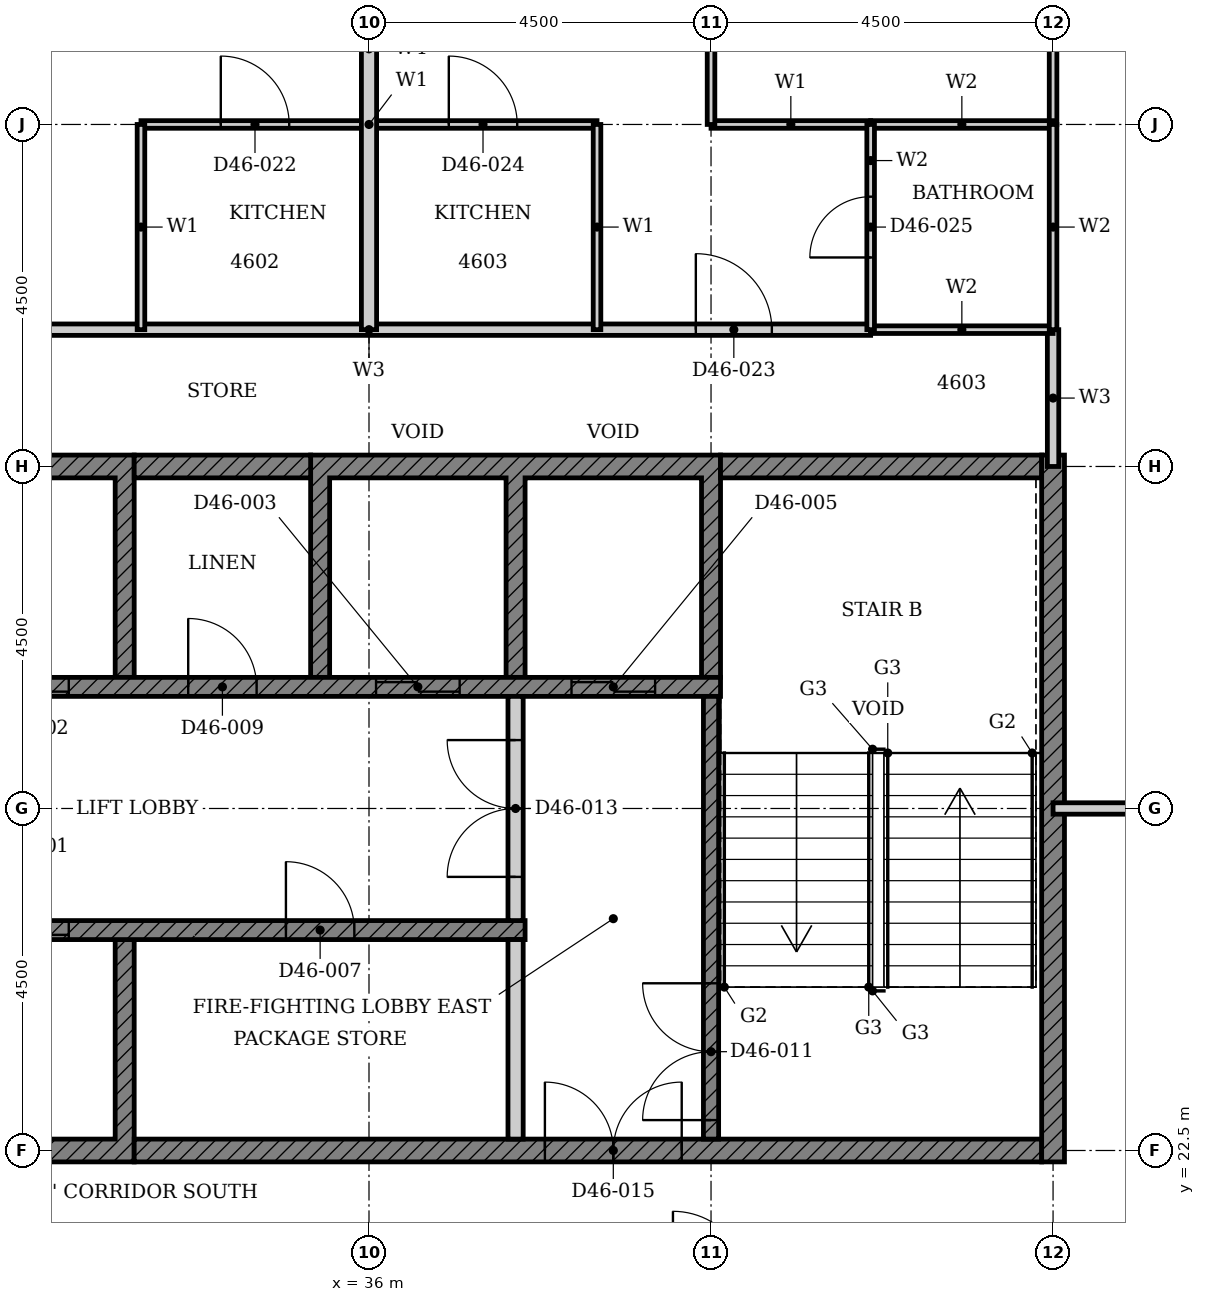
"""IFC4 building model, lengths in metres.
Left out: names, types, materials, properties, quantities, classifications, styles, units other than length and angle.
Written with IfcOpenShell. Run it as: python <this file> out.ifc"""

import sys

from ifc_helpers import new_model, si_unit, direction, frame, frame_2d, origin, place, context, subcontext, project, spatial, polyline, rectangle, outline, extrude, element, fill, save


model = new_model("IFC4")
c1 = context("Model", 3, precision=1e-05, world=origin(), true_north=direction((0.0, 1.0)))
c2 = subcontext(c1, "Body", "Model", "MODEL_VIEW")
j1 = project(units=[si_unit("LENGTHUNIT", "METRE"), si_unit("PLANEANGLEUNIT", "RADIAN")], contexts=[c1])
p1 = place(None, origin())
s1 = spatial("IfcSite", under=j1, at=p1, CompositionType="ELEMENT")
p2 = place(p1, origin())
s2 = spatial("IfcBuilding", under=s1, at=p2, CompositionType="ELEMENT")
p3 = place(p2, frame((0.0, 0.0, 183.9)))
s3 = spatial("IfcBuildingStorey", under=s2, at=p3, CompositionType="ELEMENT", Elevation=183.9)
p4 = place(p3, origin())
e1 = element("IfcWall", 1, at=p4, inside=s3, PredefinedType="SHEAR", context=c2, shape_type="SweptSolid", body=[
    extrude(outline(polyline([(27.518, 22.35), (32.911, 22.35), (32.911, 25.275), (32.661, 25.275), (32.661, 22.65), (30.339, 22.65), (30.339, 25.275), (30.089, 25.275), (30.089, 22.65), (27.768, 22.65), (27.768, 25.275), (27.518, 25.275), (27.518, 22.35)])), origin(), (0.0, 0.0, 1.0), 3.3),
])
p5 = place(p3, origin())
e2 = element("IfcWall", 2, at=p5, inside=s3, PredefinedType="SHEAR", context=c2, shape_type="SweptSolid", body=[
    extrude(outline(polyline([(27.518, 28.725), (27.768, 28.725), (27.768, 31.35), (30.089, 31.35), (30.089, 28.725), (30.339, 28.725), (30.339, 31.35), (32.661, 31.35), (32.661, 28.725), (32.911, 28.725), (32.911, 31.65), (27.518, 31.65), (27.518, 28.725)])), origin(), (0.0, 0.0, 1.0), 3.3),
])
p6 = place(p3, origin())
e3 = element("IfcWall", 3, at=p6, inside=s3, PredefinedType="SHEAR", context=c2, shape_type="SweptSolid", body=[
    extrude(outline(polyline([(35.232, 28.725), (35.482, 28.725), (35.482, 31.35), (37.803, 31.35), (37.803, 28.725), (38.053, 28.725), (38.053, 31.35), (40.375, 31.35), (40.375, 28.725), (40.625, 28.725), (40.625, 31.65), (35.232, 31.65), (35.232, 28.725)])), origin(), (0.0, 0.0, 1.0), 3.3),
])
p7 = place(p3, frame((32.911, 22.5, 0.0), z_axis=(0.0, 0.0, 1.0), x_axis=(1.0, 0.0, 0.0)))
e4 = element("IfcWall", 4, at=p7, inside=s3, PredefinedType="SHEAR", context=c2, shape_type="SweptSolid", body=[
    extrude(rectangle(XDim=11.939, YDim=0.3, at=frame_2d((5.97, 0.0))), origin(), (0.0, 0.0, 1.0), 3.3),
])
p8 = place(p7, frame((5.404, 0.0, 0.0)))
e5 = element("IfcOpeningElement", 5, at=p8, cuts=e4, PredefinedType="OPENING", context=c2, shape_type="SweptSolid", body=[
    extrude(rectangle(XDim=1.8, YDim=2.1, at=frame_2d((0.9, 1.05))), frame((0.0, 0.16, 0.0), z_axis=(0.0, -1.0, 0.0), x_axis=(1.0, 0.0, 0.0)), (0.0, 0.0, 1.0), 0.32),
])
p9 = place(p3, frame((32.911, 31.5, 0.0), z_axis=(0.0, 0.0, 1.0), x_axis=(1.0, 0.0, 0.0)))
e6 = element("IfcWall", 6, at=p9, inside=s3, PredefinedType="SHEAR", context=c2, shape_type="SweptSolid", body=[
    extrude(rectangle(XDim=2.322, YDim=0.3, at=frame_2d((1.161, 0.0))), origin(), (0.0, 0.0, 1.0), 3.3),
])
p10 = place(p3, frame((40.625, 31.5, 0.0), z_axis=(0.0, 0.0, 1.0), x_axis=(1.0, 0.0, 0.0)))
e7 = element("IfcWall", 7, at=p10, inside=s3, PredefinedType="SHEAR", context=c2, shape_type="SweptSolid", body=[
    extrude(rectangle(XDim=4.225, YDim=0.3, at=frame_2d((2.113, 0.0))), origin(), (0.0, 0.0, 1.0), 3.3),
])
p11 = place(p3, frame((45.0, 22.35, 0.0), z_axis=(0.0, 0.0, 1.0), x_axis=(0.0, 1.0, 0.0)))
e8 = element("IfcWall", 8, at=p11, inside=s3, PredefinedType="SHEAR", context=c2, shape_type="SweptSolid", body=[
    extrude(rectangle(XDim=9.3, YDim=0.3, at=frame_2d((4.65, 0.0))), origin(), (0.0, 0.0, 1.0), 3.3),
])
p12 = place(p3, frame((22.375, 25.4, 0.0), z_axis=(0.0, 0.0, 1.0), x_axis=(1.0, 0.0, 0.0)))
e9 = element("IfcWall", 9, at=p12, inside=s3, PredefinedType="SHEAR", context=c2, shape_type="SweptSolid", body=[
    extrude(rectangle(XDim=15.678, YDim=0.25, at=frame_2d((7.839, 0.0))), origin(), (0.0, 0.0, 1.0), 3.3),
])
p13 = place(p12, frame((8.575, 0.0, 0.0)))
e10 = element("IfcOpeningElement", 10, at=p13, cuts=e9, PredefinedType="OPENING", context=c2, shape_type="SweptSolid", body=[
    extrude(rectangle(XDim=1.1, YDim=2.1, at=frame_2d((0.55, 1.05))), frame((0.0, 0.135, 0.0), z_axis=(0.0, -1.0, 0.0), x_axis=(1.0, 0.0, 0.0)), (0.0, 0.0, 1.0), 0.27),
])
p14 = place(p12, frame((0.861, 0.0, 0.0)))
e11 = element("IfcOpeningElement", 11, at=p14, cuts=e9, PredefinedType="OPENING", context=c2, shape_type="SweptSolid", body=[
    extrude(rectangle(XDim=1.1, YDim=2.1, at=frame_2d((0.55, 1.05))), frame((0.0, 0.135, 0.0), z_axis=(0.0, -1.0, 0.0), x_axis=(1.0, 0.0, 0.0)), (0.0, 0.0, 1.0), 0.27),
])
p15 = place(p12, frame((3.532, 0.0, 0.0)))
e12 = element("IfcOpeningElement", 12, at=p15, cuts=e9, PredefinedType="OPENING", context=c2, shape_type="SweptSolid", body=[
    extrude(rectangle(XDim=0.9, YDim=2.1, at=frame_2d((0.45, 1.05))), frame((0.0, 0.135, 0.0), z_axis=(0.0, -1.0, 0.0), x_axis=(1.0, 0.0, 0.0)), (0.0, 0.0, 1.0), 0.27),
])
p16 = place(p12, frame((12.532, 0.0, 0.0)))
e13 = element("IfcOpeningElement", 13, at=p16, cuts=e9, PredefinedType="OPENING", context=c2, shape_type="SweptSolid", body=[
    extrude(rectangle(XDim=0.9, YDim=2.1, at=frame_2d((0.45, 1.05))), frame((0.0, 0.135, 0.0), z_axis=(0.0, -1.0, 0.0), x_axis=(1.0, 0.0, 0.0)), (0.0, 0.0, 1.0), 0.27),
])
p17 = place(p3, frame((24.947, 28.6, 0.0), z_axis=(0.0, 0.0, 1.0), x_axis=(1.0, 0.0, 0.0)))
e14 = element("IfcWall", 14, at=p17, inside=s3, PredefinedType="SHEAR", context=c2, shape_type="SweptSolid", body=[
    extrude(rectangle(XDim=15.678, YDim=0.25, at=frame_2d((7.839, 0.0))), origin(), (0.0, 0.0, 1.0), 3.3),
])
p18 = place(p17, frame((6.004, 0.0, 0.0)))
e15 = element("IfcOpeningElement", 15, at=p18, cuts=e14, PredefinedType="OPENING", context=c2, shape_type="SweptSolid", body=[
    extrude(rectangle(XDim=1.1, YDim=2.1, at=frame_2d((0.55, 1.05))), frame((0.0, 0.135, 0.0), z_axis=(0.0, -1.0, 0.0), x_axis=(1.0, 0.0, 0.0)), (0.0, 0.0, 1.0), 0.27),
])
p19 = place(p17, frame((11.146, 0.0, 0.0)))
e16 = element("IfcOpeningElement", 16, at=p19, cuts=e14, PredefinedType="OPENING", context=c2, shape_type="SweptSolid", body=[
    extrude(rectangle(XDim=1.1, YDim=2.1, at=frame_2d((0.55, 1.05))), frame((0.0, 0.135, 0.0), z_axis=(0.0, -1.0, 0.0), x_axis=(1.0, 0.0, 0.0)), (0.0, 0.0, 1.0), 0.27),
])
p20 = place(p17, frame((13.718, 0.0, 0.0)))
e17 = element("IfcOpeningElement", 17, at=p20, cuts=e14, PredefinedType="OPENING", context=c2, shape_type="SweptSolid", body=[
    extrude(rectangle(XDim=1.1, YDim=2.1, at=frame_2d((0.55, 1.05))), frame((0.0, 0.135, 0.0), z_axis=(0.0, -1.0, 0.0), x_axis=(1.0, 0.0, 0.0)), (0.0, 0.0, 1.0), 0.27),
])
p21 = place(p17, frame((0.961, 0.0, 0.0)))
e18 = element("IfcOpeningElement", 18, at=p21, cuts=e14, PredefinedType="OPENING", context=c2, shape_type="SweptSolid", body=[
    extrude(rectangle(XDim=0.9, YDim=2.1, at=frame_2d((0.45, 1.05))), frame((0.0, 0.135, 0.0), z_axis=(0.0, -1.0, 0.0), x_axis=(1.0, 0.0, 0.0)), (0.0, 0.0, 1.0), 0.27),
])
p22 = place(p17, frame((8.675, 0.0, 0.0)))
e19 = element("IfcOpeningElement", 19, at=p22, cuts=e14, PredefinedType="OPENING", context=c2, shape_type="SweptSolid", body=[
    extrude(rectangle(XDim=0.9, YDim=2.1, at=frame_2d((0.45, 1.05))), frame((0.0, 0.135, 0.0), z_axis=(0.0, -1.0, 0.0), x_axis=(1.0, 0.0, 0.0)), (0.0, 0.0, 1.0), 0.27),
])
p23 = place(p3, frame((37.928, 22.65, 0.0), z_axis=(0.0, 0.0, 1.0), x_axis=(0.0, 1.0, 0.0)))
e20 = element("IfcWall", 20, at=p23, inside=s3, PredefinedType="PARTITIONING", context=c2, shape_type="SweptSolid", body=[
    extrude(rectangle(XDim=2.625, YDim=0.2, at=frame_2d((1.312, 0.0))), origin(), (0.0, 0.0, 1.0), 3.3),
])
p24 = place(p3, frame((40.5, 22.65, 0.0), z_axis=(0.0, 0.0, 1.0), x_axis=(0.0, 1.0, 0.0)))
e21 = element("IfcWall", 21, at=p24, inside=s3, PredefinedType="SHEAR", context=c2, shape_type="SweptSolid", body=[
    extrude(rectangle(XDim=5.825, YDim=0.2, at=frame_2d((2.913, 0.0))), origin(), (0.0, 0.0, 1.0), 3.3),
])
p25 = place(p24, frame((0.25, 0.0, 0.0)))
e22 = element("IfcOpeningElement", 22, at=p25, cuts=e21, PredefinedType="OPENING", context=c2, shape_type="SweptSolid", body=[
    extrude(rectangle(XDim=1.8, YDim=2.1, at=frame_2d((0.9, 1.05))), frame((0.0, 0.11, 0.0), z_axis=(0.0, -1.0, 0.0), x_axis=(1.0, 0.0, 0.0)), (0.0, 0.0, 1.0), 0.22),
])
p26 = place(p3, frame((37.928, 25.525, 0.0), z_axis=(0.0, 0.0, 1.0), x_axis=(0.0, 1.0, 0.0)))
e23 = element("IfcWall", 23, at=p26, inside=s3, PredefinedType="PARTITIONING", context=c2, shape_type="SweptSolid", body=[
    extrude(rectangle(XDim=2.95, YDim=0.2, at=frame_2d((1.475, 0.0))), origin(), (0.0, 0.0, 1.0), 3.3),
])
p27 = place(p26, frame((0.575, 0.0, 0.0)))
e24 = element("IfcOpeningElement", 24, at=p27, cuts=e23, PredefinedType="OPENING", context=c2, shape_type="SweptSolid", body=[
    extrude(rectangle(XDim=1.8, YDim=2.1, at=frame_2d((0.9, 1.05))), frame((0.0, 0.11, 0.0), z_axis=(0.0, -1.0, 0.0), x_axis=(1.0, 0.0, 0.0)), (0.0, 0.0, 1.0), 0.22),
])
p28 = place(p3, frame((45.0, 27.0, 0.0), z_axis=(0.0, 0.0, 1.0), x_axis=(1.0, 0.0, 0.0)))
e25 = element("IfcWall", 25, at=p28, inside=s3, PredefinedType="PARTITIONING", context=c2, shape_type="SweptSolid", body=[
    extrude(rectangle(XDim=13.5, YDim=0.15, at=frame_2d((6.75, 0.0))), origin(), (0.0, 0.0, 1.0), 2.58),
])
p29 = place(p28, frame((7.15, 0.0, 0.0)))
e26 = element("IfcOpeningElement", 26, at=p29, cuts=e25, PredefinedType="OPENING", context=c2, shape_type="SweptSolid", body=[
    extrude(rectangle(XDim=1.0, YDim=2.1, at=frame_2d((0.5, 1.05))), frame((0.0, 0.085, 0.0), z_axis=(0.0, -1.0, 0.0), x_axis=(1.0, 0.0, 0.0)), (0.0, 0.0, 1.0), 0.17),
])
p30 = place(p3, frame((29.4, 33.3, 0.0), z_axis=(0.0, 0.0, 1.0), x_axis=(1.0, 0.0, 0.0)))
e27 = element("IfcWall", 27, at=p30, inside=s3, PredefinedType="PARTITIONING", context=c2, shape_type="SweptSolid", body=[
    extrude(rectangle(XDim=13.2, YDim=0.15, at=frame_2d((6.6, 0.0))), origin(), (0.0, 0.0, 1.0), 3.3),
])
p31 = place(p30, frame((1.3, 0.0, 0.0)))
e28 = element("IfcOpeningElement", 28, at=p31, cuts=e27, PredefinedType="OPENING", context=c2, shape_type="SweptSolid", body=[
    extrude(rectangle(XDim=1.0, YDim=2.2, at=frame_2d((0.5, 1.1))), frame((0.0, 0.085, 0.0), z_axis=(0.0, -1.0, 0.0), x_axis=(1.0, 0.0, 0.0)), (0.0, 0.0, 1.0), 0.17),
])
p32 = place(p30, frame((10.9, 0.0, 0.0)))
e29 = element("IfcOpeningElement", 29, at=p32, cuts=e27, PredefinedType="OPENING", context=c2, shape_type="SweptSolid", body=[
    extrude(rectangle(XDim=1.0, YDim=2.2, at=frame_2d((0.5, 1.1))), frame((0.0, 0.085, 0.0), z_axis=(0.0, -1.0, 0.0), x_axis=(1.0, 0.0, 0.0)), (0.0, 0.0, 1.0), 0.17),
])
p33 = place(p3, frame((45.0, 31.5, 0.0), z_axis=(0.0, 0.0, 1.0), x_axis=(0.0, 1.0, 0.0)))
e30 = element("IfcWall", 30, at=p33, inside=s3, PredefinedType="PARTITIONING", context=c2, shape_type="SweptSolid", body=[
    extrude(rectangle(XDim=1.8, YDim=0.15, at=frame_2d((0.9, 0.0))), origin(), (0.0, 0.0, 1.0), 3.3),
])
p34 = place(p3, frame((33.0, 36.0, 0.0), z_axis=(0.0, 0.0, 1.0), x_axis=(1.0, 0.0, 0.0)))
e31 = element("IfcWall", 31, at=p34, inside=s3, PredefinedType="PARTITIONING", context=c2, shape_type="SweptSolid", body=[
    extrude(rectangle(XDim=6.0, YDim=0.1, at=frame_2d((3.0, 0.0))), origin(), (0.0, 0.0, 1.0), 3.3),
])
p35 = place(p34, frame((1.05, 0.0, 0.0)))
e32 = element("IfcOpeningElement", 32, at=p35, cuts=e31, PredefinedType="OPENING", context=c2, shape_type="SweptSolid", body=[
    extrude(rectangle(XDim=0.9, YDim=2.1, at=frame_2d((0.45, 1.05))), frame((0.0, 0.06, 0.0), z_axis=(0.0, -1.0, 0.0), x_axis=(1.0, 0.0, 0.0)), (0.0, 0.0, 1.0), 0.12),
])
p36 = place(p34, frame((4.05, 0.0, 0.0)))
e33 = element("IfcOpeningElement", 33, at=p36, cuts=e31, PredefinedType="OPENING", context=c2, shape_type="SweptSolid", body=[
    extrude(rectangle(XDim=0.9, YDim=2.1, at=frame_2d((0.45, 1.05))), frame((0.0, 0.06, 0.0), z_axis=(0.0, -1.0, 0.0), x_axis=(1.0, 0.0, 0.0)), (0.0, 0.0, 1.0), 0.12),
])
p37 = place(p3, frame((40.5, 36.0, 0.0), z_axis=(0.0, 0.0, 1.0), x_axis=(1.0, 0.0, 0.0)))
e34 = element("IfcWall", 34, at=p37, inside=s3, PredefinedType="PARTITIONING", context=c2, shape_type="SweptSolid", body=[
    extrude(rectangle(XDim=2.1, YDim=0.1, at=frame_2d((1.05, 0.0))), origin(), (0.0, 0.0, 1.0), 3.3),
])
for number, where, z_axis, x_axis in (
    (35, (33.0, 33.3, 0.0), (0.0, 0.0, 1.0), (0.0, 1.0, 0.0)),
    (36, (39.0, 33.3, 0.0), (0.0, 0.0, 1.0), (0.0, 1.0, 0.0)),
):
    element("IfcWall", number, at=place(p3, frame(where, z_axis=z_axis, x_axis=x_axis)), inside=s3, PredefinedType="PARTITIONING", context=c2, shape_type="SweptSolid", body=[
        extrude(rectangle(XDim=2.7, YDim=0.1, at=frame_2d((1.35, 0.0))), origin(), (0.0, 0.0, 1.0), 3.3),
    ])
p38 = place(p3, frame((40.5, 36.0, 0.0), z_axis=(0.0, 0.0, 1.0), x_axis=(0.0, 1.0, 0.0)))
e37 = element("IfcWall", 37, at=p38, inside=s3, PredefinedType="PARTITIONING", context=c2, shape_type="SweptSolid", body=[
    extrude(rectangle(XDim=4.815, YDim=0.1, at=frame_2d((2.407, 0.0))), origin(), (0.0, 0.0, 1.0), 3.3),
])
p39 = place(p38, frame((1.8, 0.0, 0.0)))
e38 = element("IfcOpeningElement", 38, at=p39, cuts=e37, PredefinedType="OPENING", context=c2, shape_type="SweptSolid", body=[
    extrude(rectangle(XDim=0.9, YDim=2.1, at=frame_2d((0.45, 1.05))), frame((0.0, 0.06, 0.0), z_axis=(0.0, -1.0, 0.0), x_axis=(1.0, 0.0, 0.0)), (0.0, 0.0, 1.0), 0.12),
])
p40 = place(p3, frame((45.0, 36.001, 0.0), z_axis=(0.0, 0.0, 1.0), x_axis=(0.0, 1.0, 0.0)))
e39 = element("IfcWall", 39, at=p40, inside=s3, PredefinedType="PARTITIONING", context=c2, shape_type="SweptSolid", body=[
    extrude(rectangle(XDim=2.439, YDim=0.1, at=frame_2d((1.219, 0.0))), origin(), (0.0, 0.0, 1.0), 3.3),
])
p41 = place(p3, frame((36.0, 33.3, 0.0), z_axis=(0.0, 0.0, 1.0), x_axis=(0.0, 1.0, 0.0)))
e40 = element("IfcWall", 40, at=p41, inside=s3, PredefinedType="PARTITIONING", context=c2, shape_type="SweptSolid", body=[
    extrude(rectangle(XDim=7.39, YDim=0.2, at=frame_2d((3.695, 0.0))), origin(), (0.0, 0.0, 1.0), 3.3),
])
for number, where, z_axis, x_axis in (
    (41, (42.6, 33.3, 0.0), (0.0, 0.0, 1.0), (1.0, 0.0, 0.0)),
    (42, (42.6, 36.0, 0.0), (0.0, 0.0, 1.0), (1.0, 0.0, 0.0)),
):
    element("IfcWall", number, at=place(p3, frame(where, z_axis=z_axis, x_axis=x_axis)), inside=s3, PredefinedType="PARTITIONING", context=c2, shape_type="SweptSolid", body=[
        extrude(rectangle(XDim=2.4, YDim=0.1, at=frame_2d((1.2, 0.0))), origin(), (0.0, 0.0, 1.0), 3.3),
    ])
p42 = place(p3, frame((42.6, 33.3, 0.0), z_axis=(0.0, 0.0, 1.0), x_axis=(0.0, 1.0, 0.0)))
e43 = element("IfcWall", 43, at=p42, inside=s3, PredefinedType="PARTITIONING", context=c2, shape_type="SweptSolid", body=[
    extrude(rectangle(XDim=2.7, YDim=0.1, at=frame_2d((1.35, 0.0))), origin(), (0.0, 0.0, 1.0), 3.3),
])
p43 = place(p42, frame((0.95, 0.0, 0.0)))
e44 = element("IfcOpeningElement", 44, at=p43, cuts=e43, PredefinedType="OPENING", context=c2, shape_type="SweptSolid", body=[
    extrude(rectangle(XDim=0.8, YDim=2.1, at=frame_2d((0.4, 1.05))), frame((0.0, 0.06, 0.0), z_axis=(0.0, -1.0, 0.0), x_axis=(1.0, 0.0, 0.0)), (0.0, 0.0, 1.0), 0.12),
])
p44 = place(p3, frame((45.0, 33.3, 0.0), z_axis=(0.0, 0.0, 1.0), x_axis=(0.0, 1.0, 0.0)))
e45 = element("IfcWall", 45, at=p44, inside=s3, PredefinedType="PARTITIONING", context=c2, shape_type="SweptSolid", body=[
    extrude(rectangle(XDim=2.7, YDim=0.1, at=frame_2d((1.35, 0.0))), origin(), (0.0, 0.0, 1.0), 3.3),
])
p45 = place(p13, origin())
e46 = element("IfcDoor", 46, at=p45, inside=s3, OperationType="DOUBLE_DOOR_SLIDING", PredefinedType="DOOR", context=c2, shape_type="SweptSolid", body=[
    extrude(rectangle(XDim=1.1, YDim=2.1, at=frame_2d((0.55, 1.05))), frame((0.0, 0.025, 0.0), z_axis=(0.0, -1.0, 0.0), x_axis=(1.0, 0.0, 0.0)), (0.0, 0.0, 1.0), 0.05),
])
fill(e10, e46)
p46 = place(p18, origin())
e47 = element("IfcDoor", 47, at=p46, inside=s3, OperationType="DOUBLE_DOOR_SLIDING", PredefinedType="DOOR", context=c2, shape_type="SweptSolid", body=[
    extrude(rectangle(XDim=1.1, YDim=2.1, at=frame_2d((0.55, 1.05))), frame((0.0, 0.025, 0.0), z_axis=(0.0, -1.0, 0.0), x_axis=(1.0, 0.0, 0.0)), (0.0, 0.0, 1.0), 0.05),
])
fill(e15, e47)
p47 = place(p19, origin())
e48 = element("IfcDoor", 48, at=p47, inside=s3, OperationType="DOUBLE_DOOR_SLIDING", PredefinedType="DOOR", context=c2, shape_type="SweptSolid", body=[
    extrude(rectangle(XDim=1.1, YDim=2.1, at=frame_2d((0.55, 1.05))), frame((0.0, 0.025, 0.0), z_axis=(0.0, -1.0, 0.0), x_axis=(1.0, 0.0, 0.0)), (0.0, 0.0, 1.0), 0.05),
])
fill(e16, e48)
p48 = place(p20, origin())
e49 = element("IfcDoor", 49, at=p48, inside=s3, OperationType="DOUBLE_DOOR_SLIDING", PredefinedType="DOOR", context=c2, shape_type="SweptSolid", body=[
    extrude(rectangle(XDim=1.1, YDim=2.1, at=frame_2d((0.55, 1.05))), frame((0.0, 0.025, 0.0), z_axis=(0.0, -1.0, 0.0), x_axis=(1.0, 0.0, 0.0)), (0.0, 0.0, 1.0), 0.05),
])
fill(e17, e49)
p49 = place(p16, origin())
e50 = element("IfcDoor", 50, at=p49, inside=s3, OperationType="SINGLE_SWING_LEFT", PredefinedType="DOOR", context=c2, shape_type="SweptSolid", body=[
    extrude(rectangle(XDim=0.9, YDim=2.1, at=frame_2d((0.45, 1.05))), frame((0.0, 0.025, 0.0), z_axis=(0.0, -1.0, 0.0), x_axis=(1.0, 0.0, 0.0)), (0.0, 0.0, 1.0), 0.05),
])
fill(e13, e50)
p50 = place(p22, origin())
e51 = element("IfcDoor", 51, at=p50, inside=s3, OperationType="SINGLE_SWING_LEFT", PredefinedType="DOOR", context=c2, shape_type="SweptSolid", body=[
    extrude(rectangle(XDim=0.9, YDim=2.1, at=frame_2d((0.45, 1.05))), frame((0.0, 0.025, 0.0), z_axis=(0.0, -1.0, 0.0), x_axis=(1.0, 0.0, 0.0)), (0.0, 0.0, 1.0), 0.05),
])
fill(e19, e51)
p51 = place(p25, origin())
e52 = element("IfcDoor", 52, at=p51, inside=s3, OperationType="DOUBLE_DOOR_SINGLE_SWING", PredefinedType="DOOR", context=c2, shape_type="SweptSolid", body=[
    extrude(rectangle(XDim=1.8, YDim=2.1, at=frame_2d((0.9, 1.05))), frame((0.0, 0.025, 0.0), z_axis=(0.0, -1.0, 0.0), x_axis=(1.0, 0.0, 0.0)), (0.0, 0.0, 1.0), 0.05),
])
fill(e22, e52)
p52 = place(p27, origin())
e53 = element("IfcDoor", 53, at=p52, inside=s3, OperationType="DOUBLE_DOOR_SINGLE_SWING", PredefinedType="DOOR", context=c2, shape_type="SweptSolid", body=[
    extrude(rectangle(XDim=1.8, YDim=2.1, at=frame_2d((0.9, 1.05))), frame((0.0, 0.025, 0.0), z_axis=(0.0, -1.0, 0.0), x_axis=(1.0, 0.0, 0.0)), (0.0, 0.0, 1.0), 0.05),
])
fill(e24, e53)
p53 = place(p8, origin())
e54 = element("IfcDoor", 54, at=p53, inside=s3, OperationType="DOUBLE_DOOR_SINGLE_SWING", PredefinedType="DOOR", context=c2, shape_type="SweptSolid", body=[
    extrude(rectangle(XDim=1.8, YDim=2.1, at=frame_2d((0.9, 1.05))), frame((0.0, 0.025, 0.0), z_axis=(0.0, -1.0, 0.0), x_axis=(1.0, 0.0, 0.0)), (0.0, 0.0, 1.0), 0.05),
])
fill(e5, e54)
p54 = place(p35, origin())
e55 = element("IfcDoor", 55, at=p54, inside=s3, OperationType="SINGLE_SWING_RIGHT", PredefinedType="DOOR", context=c2, shape_type="SweptSolid", body=[
    extrude(rectangle(XDim=0.9, YDim=2.1, at=frame_2d((0.45, 1.05))), frame((0.0, 0.025, 0.0), z_axis=(0.0, -1.0, 0.0), x_axis=(1.0, 0.0, 0.0)), (0.0, 0.0, 1.0), 0.05),
])
fill(e32, e55)
p55 = place(p32, origin())
e56 = element("IfcDoor", 56, at=p55, inside=s3, OperationType="SINGLE_SWING_RIGHT", PredefinedType="DOOR", context=c2, shape_type="SweptSolid", body=[
    extrude(rectangle(XDim=1.0, YDim=2.2, at=frame_2d((0.5, 1.1))), frame((0.0, 0.025, 0.0), z_axis=(0.0, -1.0, 0.0), x_axis=(1.0, 0.0, 0.0)), (0.0, 0.0, 1.0), 0.05),
])
fill(e29, e56)
p56 = place(p36, origin())
e57 = element("IfcDoor", 57, at=p56, inside=s3, OperationType="SINGLE_SWING_RIGHT", PredefinedType="DOOR", context=c2, shape_type="SweptSolid", body=[
    extrude(rectangle(XDim=0.9, YDim=2.1, at=frame_2d((0.45, 1.05))), frame((0.0, 0.025, 0.0), z_axis=(0.0, -1.0, 0.0), x_axis=(1.0, 0.0, 0.0)), (0.0, 0.0, 1.0), 0.05),
])
fill(e33, e57)
p57 = place(p43, origin())
e58 = element("IfcDoor", 58, at=p57, inside=s3, OperationType="SINGLE_SWING_LEFT", PredefinedType="DOOR", context=c2, shape_type="SweptSolid", body=[
    extrude(rectangle(XDim=0.8, YDim=2.1, at=frame_2d((0.4, 1.05))), frame((0.0, 0.025, 0.0), z_axis=(0.0, -1.0, 0.0), x_axis=(1.0, 0.0, 0.0)), (0.0, 0.0, 1.0), 0.05),
])
fill(e44, e58)
save(model, sys.argv[1])
